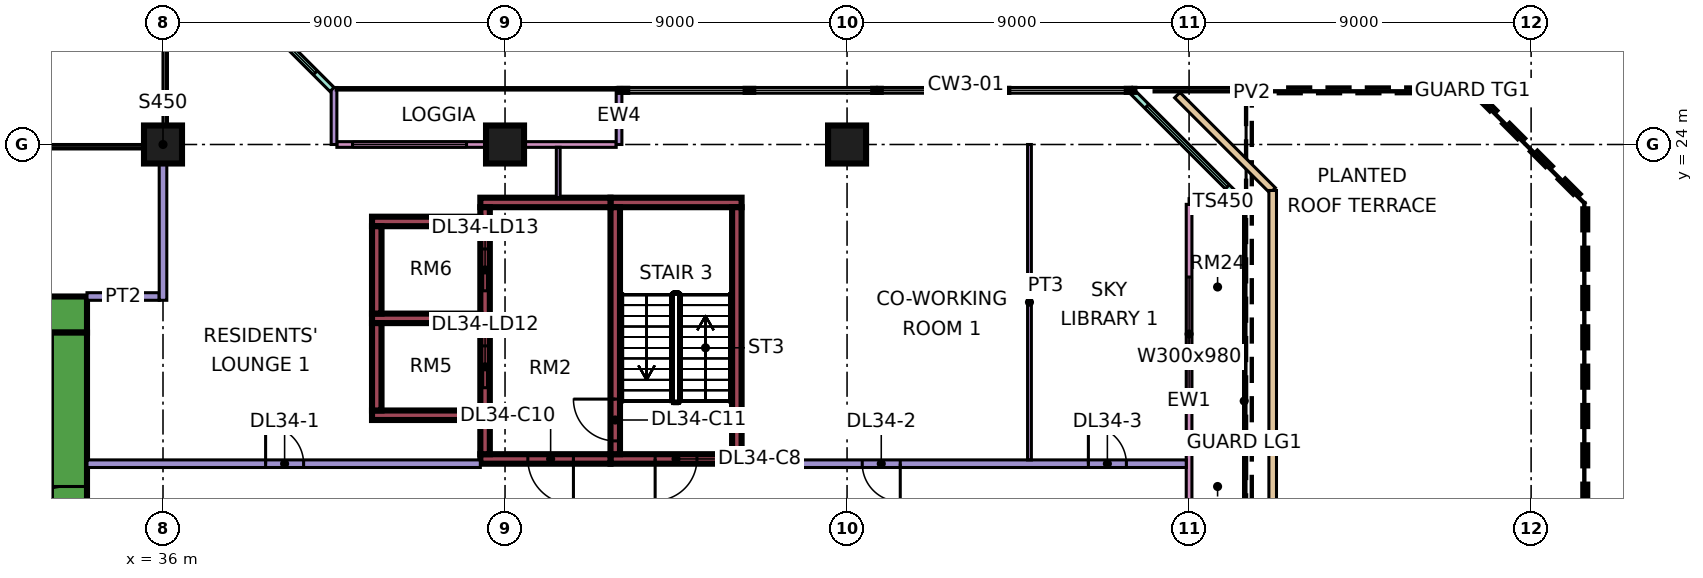
"""IFC4 building model, lengths in metres.
Left out: names, types, materials, properties, quantities, classifications, styles, units other than length and angle.
Written with IfcOpenShell. Run it as: python <this file> out.ifc"""

import sys

from ifc_helpers import new_model, si_unit, direction, frame, frame_2d, origin, origin_2d, place, context, subcontext, project, spatial, rectangle, extrude, element, fill, save


model = new_model("IFC4")
c1 = context("Model", 3, precision=1e-05, world=origin(), true_north=direction((0.0, 1.0)))
c2 = subcontext(c1, "Body", "Model", "MODEL_VIEW")
j1 = project(units=[si_unit("LENGTHUNIT", "METRE"), si_unit("PLANEANGLEUNIT", "RADIAN")], contexts=[c1])
p1 = place(None, origin())
s1 = spatial("IfcSite", under=j1, at=p1, CompositionType="ELEMENT")
p2 = place(p1, origin())
s2 = spatial("IfcBuilding", under=s1, at=p2, CompositionType="ELEMENT")
p3 = place(p2, frame((0.0, 0.0, 146.15)))
s3 = spatial("IfcBuildingStorey", under=s2, at=p3, CompositionType="ELEMENT", Elevation=146.15)
for number, where, z_axis, x_axis in (
    (1, (36.0, 24.0, 0.0), (0.0, 0.0, 1.0), (1.0, 0.0, 0.0)),
    (2, (45.0, 24.0, 0.0), (0.0, 0.0, 1.0), (1.0, 0.0, 0.0)),
    (3, (54.0, 24.0, 0.0), (0.0, 0.0, 1.0), (1.0, 0.0, 0.0)),
):
    element("IfcColumn", number, at=place(p3, frame(where, z_axis=z_axis, x_axis=x_axis)), inside=s3, PredefinedType="COLUMN", context=c2, shape_type="SweptSolid", body=[
        extrude(rectangle(XDim=1.0, YDim=1.0, at=origin_2d()), origin(), (0.0, 0.0, 1.0), 11.25),
    ])
p4 = place(p3, frame((9.0, 19.525, 0.0), z_axis=(0.0, 0.0, 1.0), x_axis=(1.0, 0.0, 0.0)))
e4 = element("IfcWall", 4, at=p4, inside=s3, PredefinedType="SHEAR", context=c2, shape_type="SweptSolid", body=[
    extrude(rectangle(XDim=25.0, YDim=0.95, at=frame_2d((12.5, 0.0))), origin(), (0.0, 0.0, 1.0), 11.25),
])
p5 = place(p4, frame((19.1, 0.0, 0.0)))
e5 = element("IfcOpeningElement", 5, at=p5, cuts=e4, PredefinedType="OPENING", context=c2, shape_type="SweptSolid", body=[
    extrude(rectangle(XDim=1.8, YDim=2.4, at=frame_2d((0.9, 1.2))), frame((0.0, 0.485, 0.0), z_axis=(0.0, -1.0, 0.0), x_axis=(1.0, 0.0, 0.0)), (0.0, 0.0, 1.0), 0.97),
])
p6 = place(p3, frame((33.525, 7.95, 0.0), z_axis=(0.0, 0.0, 1.0), x_axis=(0.0, 1.0, 0.0)))
e6 = element("IfcWall", 6, at=p6, inside=s3, PredefinedType="SHEAR", context=c2, shape_type="SweptSolid", body=[
    extrude(rectangle(XDim=11.1, YDim=0.95, at=frame_2d((5.55, 0.0))), origin(), (0.0, 0.0, 1.0), 11.25),
])
p7 = place(p6, frame((5.25, 0.0, 0.0)))
e7 = element("IfcOpeningElement", 7, at=p7, cuts=e6, PredefinedType="OPENING", context=c2, shape_type="SweptSolid", body=[
    extrude(rectangle(XDim=1.8, YDim=2.4, at=frame_2d((0.9, 1.2))), frame((0.0, 0.485, 0.0), z_axis=(0.0, -1.0, 0.0), x_axis=(1.0, 0.0, 0.0)), (0.0, 0.0, 1.0), 0.97),
])
p8 = place(p3, frame((47.775, 15.725, 0.0), z_axis=(0.0, 0.0, 1.0), x_axis=(1.0, 0.0, 0.0)))
e8 = element("IfcWall", 8, at=p8, inside=s3, PredefinedType="SHEAR", context=c2, shape_type="SweptSolid", body=[
    extrude(rectangle(XDim=3.45, YDim=0.25, at=frame_2d((1.725, 0.0))), origin(), (0.0, 0.0, 1.0), 11.25),
])
p9 = place(p8, frame((1.175, 0.0, 0.0)))
e9 = element("IfcOpeningElement", 9, at=p9, cuts=e8, PredefinedType="OPENING", context=c2, shape_type="SweptSolid", body=[
    extrude(rectangle(XDim=1.1, YDim=2.2, at=frame_2d((0.55, 1.1))), frame((0.0, 0.135, 0.0), z_axis=(0.0, -1.0, 0.0), x_axis=(1.0, 0.0, 0.0)), (0.0, 0.0, 1.0), 0.27),
])
p10 = place(p3, frame((47.775, 22.475, 0.0), z_axis=(0.0, 0.0, 1.0), x_axis=(1.0, 0.0, 0.0)))
e10 = element("IfcWall", 10, at=p10, inside=s3, PredefinedType="SHEAR", context=c2, shape_type="SweptSolid", body=[
    extrude(rectangle(XDim=3.45, YDim=0.25, at=frame_2d((1.725, 0.0))), origin(), (0.0, 0.0, 1.0), 11.25),
])
p11 = place(p3, frame((47.9, 15.85, 0.0), z_axis=(0.0, 0.0, 1.0), x_axis=(0.0, 1.0, 0.0)))
e11 = element("IfcWall", 11, at=p11, inside=s3, PredefinedType="SHEAR", context=c2, shape_type="SweptSolid", body=[
    extrude(rectangle(XDim=6.5, YDim=0.25, at=frame_2d((3.25, 0.0))), origin(), (0.0, 0.0, 1.0), 11.25),
])
p12 = place(p11, frame((0.35, 0.0, 0.0)))
e12 = element("IfcOpeningElement", 12, at=p12, cuts=e11, PredefinedType="OPENING", context=c2, shape_type="SweptSolid", body=[
    extrude(rectangle(XDim=1.1, YDim=2.2, at=frame_2d((0.55, 1.1))), frame((0.0, 0.135, 0.0), z_axis=(0.0, -1.0, 0.0), x_axis=(1.0, 0.0, 0.0)), (0.0, 0.0, 1.0), 0.27),
])
p13 = place(p3, frame((51.1, 15.85, 0.0), z_axis=(0.0, 0.0, 1.0), x_axis=(0.0, 1.0, 0.0)))
e13 = element("IfcWall", 13, at=p13, inside=s3, PredefinedType="SHEAR", context=c2, shape_type="SweptSolid", body=[
    extrude(rectangle(XDim=6.5, YDim=0.25, at=frame_2d((3.25, 0.0))), origin(), (0.0, 0.0, 1.0), 11.25),
])
p14 = place(p3, frame((44.35, 15.725, 0.0), z_axis=(0.0, 0.0, 1.0), x_axis=(1.0, 0.0, 0.0)))
e14 = element("IfcWall", 14, at=p14, inside=s3, PredefinedType="SHEAR", context=c2, shape_type="SweptSolid", body=[
    extrude(rectangle(XDim=3.425, YDim=0.25, at=frame_2d((1.712, 0.0))), origin(), (0.0, 0.0, 1.0), 11.25),
])
p15 = place(p14, frame((1.25, 0.0, 0.0)))
e15 = element("IfcOpeningElement", 15, at=p15, cuts=e14, PredefinedType="OPENING", context=c2, shape_type="SweptSolid", body=[
    extrude(rectangle(XDim=1.2, YDim=2.2, at=frame_2d((0.6, 1.1))), frame((0.0, 0.135, 0.0), z_axis=(0.0, -1.0, 0.0), x_axis=(1.0, 0.0, 0.0)), (0.0, 0.0, 1.0), 0.27),
])
p16 = place(p3, frame((44.35, 22.475, 0.0), z_axis=(0.0, 0.0, 1.0), x_axis=(1.0, 0.0, 0.0)))
e16 = element("IfcWall", 16, at=p16, inside=s3, PredefinedType="SHEAR", context=c2, shape_type="SweptSolid", body=[
    extrude(rectangle(XDim=3.425, YDim=0.25, at=frame_2d((1.712, 0.0))), origin(), (0.0, 0.0, 1.0), 11.25),
])
p17 = place(p3, frame((44.475, 15.85, 0.0), z_axis=(0.0, 0.0, 1.0), x_axis=(0.0, 1.0, 0.0)))
e17 = element("IfcWall", 17, at=p17, inside=s3, PredefinedType="SHEAR", context=c2, shape_type="SweptSolid", body=[
    extrude(rectangle(XDim=6.5, YDim=0.25, at=frame_2d((3.25, 0.0))), origin(), (0.0, 0.0, 1.0), 11.25),
])
p18 = place(p17, frame((1.75, 0.0, 0.0)))
e18 = element("IfcOpeningElement", 18, at=p18, cuts=e17, PredefinedType="OPENING", context=c2, shape_type="SweptSolid", body=[
    extrude(rectangle(XDim=1.1, YDim=2.2, at=frame_2d((0.55, 1.1))), frame((0.0, 0.135, 0.0), z_axis=(0.0, -1.0, 0.0), x_axis=(1.0, 0.0, 0.0)), (0.0, 0.0, 1.0), 0.27),
])
p19 = place(p17, frame((4.3, 0.0, 0.0)))
e19 = element("IfcOpeningElement", 19, at=p19, cuts=e17, PredefinedType="OPENING", context=c2, shape_type="SweptSolid", body=[
    extrude(rectangle(XDim=1.1, YDim=2.2, at=frame_2d((0.55, 1.1))), frame((0.0, 0.135, 0.0), z_axis=(0.0, -1.0, 0.0), x_axis=(1.0, 0.0, 0.0)), (0.0, 0.0, 1.0), 0.27),
])
for number, where, z_axis, x_axis in (
    (20, (41.5, 16.875, 0.0), (0.0, 0.0, 1.0), (1.0, 0.0, 0.0)),
    (21, (41.5, 19.425, 0.0), (0.0, 0.0, 1.0), (1.0, 0.0, 0.0)),
    (22, (41.5, 21.975, 0.0), (0.0, 0.0, 1.0), (1.0, 0.0, 0.0)),
):
    element("IfcWall", number, at=place(p3, frame(where, z_axis=z_axis, x_axis=x_axis)), inside=s3, PredefinedType="SHEAR", context=c2, shape_type="SweptSolid", body=[
        extrude(rectangle(XDim=2.85, YDim=0.25, at=frame_2d((1.425, 0.0))), origin(), (0.0, 0.0, 1.0), 11.25),
    ])
for number, where, z_axis, x_axis in (
    (23, (41.625, 17.0, 0.0), (0.0, 0.0, 1.0), (0.0, 1.0, 0.0)),
    (24, (41.625, 19.55, 0.0), (0.0, 0.0, 1.0), (0.0, 1.0, 0.0)),
):
    element("IfcWall", number, at=place(p3, frame(where, z_axis=z_axis, x_axis=x_axis)), inside=s3, PredefinedType="SHEAR", context=c2, shape_type="SweptSolid", body=[
        extrude(rectangle(XDim=2.3, YDim=0.25, at=frame_2d((1.15, 0.0))), origin(), (0.0, 0.0, 1.0), 11.25),
    ])
p20 = place(p3, frame((47.925, 24.0, 0.0), z_axis=(0.0, 0.0, 1.0), x_axis=(-1.0, 0.0, 0.0)))
e25 = element("IfcWall", 25, at=p20, inside=s3, PredefinedType="SOLIDWALL", context=c2, shape_type="SweptSolid", body=[
    extrude(rectangle(XDim=7.35, YDim=0.15, at=frame_2d((3.675, 0.0))), origin(), (0.0, 0.0, 1.0), 10.85),
])
p21 = place(p20, frame((3.938, 0.0, 0.45)))
e26 = element("IfcOpeningElement", 26, at=p21, cuts=e25, PredefinedType="OPENING", context=c2, shape_type="SweptSolid", body=[
    extrude(rectangle(XDim=3.0, YDim=9.8, at=frame_2d((1.5, 4.9))), frame((0.0, 0.085, 0.0), z_axis=(0.0, -1.0, 0.0), x_axis=(1.0, 0.0, 0.0)), (0.0, 0.0, 1.0), 0.17),
])
for number, where, z_axis, x_axis in (
    (27, (48.0, 25.5, 0.0), (0.0, 0.0, 1.0), (0.0, -1.0, 0.0)),
    (28, (40.5, 25.5, 0.0), (0.0, 0.0, 1.0), (0.0, -1.0, 0.0)),
):
    element("IfcWall", number, at=place(p3, frame(where, z_axis=z_axis, x_axis=x_axis)), inside=s3, PredefinedType="SOLIDWALL", context=c2, shape_type="SweptSolid", body=[
        extrude(rectangle(XDim=1.5, YDim=0.15, at=frame_2d((0.75, 0.0))), origin(), (0.0, 0.0, 1.0), 10.85),
    ])
p22 = place(p3, frame((40.447, 25.447, 0.0), z_axis=(0.0, 0.0, 1.0), x_axis=(-0.707106781187, 0.707106781187, 0.0)))
e29 = element("IfcWall", 29, at=p22, inside=s3, PredefinedType="SOLIDWALL", context=c2, shape_type="SweptSolid", body=[
    extrude(rectangle(XDim=4.243, YDim=0.15, at=frame_2d((2.121, 0.0))), origin(), (0.0, 0.0, 1.0), 10.85),
])
p23 = place(p22, frame((0.621, 0.0, 0.45)))
e30 = element("IfcOpeningElement", 30, at=p23, cuts=e29, PredefinedType="OPENING", context=c2, shape_type="SweptSolid", body=[
    extrude(rectangle(XDim=3.0, YDim=9.8, at=frame_2d((1.5, 4.9))), frame((0.0, 0.085, 0.0), z_axis=(0.0, -1.0, 0.0), x_axis=(1.0, 0.0, 0.0)), (0.0, 0.0, 1.0), 0.17),
])
p24 = place(p3, frame((63.0, 12.075, 0.0), z_axis=(0.0, 0.0, 1.0), x_axis=(0.0, 1.0, 0.0)))
e31 = element("IfcWall", 31, at=p24, inside=s3, PredefinedType="SOLIDWALL", context=c2, shape_type="SweptSolid", body=[
    extrude(rectangle(XDim=10.35, YDim=0.15, at=frame_2d((5.175, 0.0))), origin(), (0.0, 0.0, 1.0), 10.85),
])
p25 = place(p24, frame((5.438, 0.0, 0.45)))
e32 = element("IfcOpeningElement", 32, at=p25, cuts=e31, PredefinedType="OPENING", context=c2, shape_type="SweptSolid", body=[
    extrude(rectangle(XDim=3.0, YDim=9.8, at=frame_2d((1.5, 4.9))), frame((0.0, 0.085, 0.0), z_axis=(0.0, -1.0, 0.0), x_axis=(1.0, 0.0, 0.0)), (0.0, 0.0, 1.0), 0.17),
])
p26 = place(p3, frame((64.5, 22.5, 0.0), z_axis=(0.0, 0.0, 1.0), x_axis=(-1.0, 0.0, 0.0)))
e33 = element("IfcWall", 33, at=p26, inside=s3, PredefinedType="SOLIDWALL", context=c2, shape_type="SweptSolid", body=[
    extrude(rectangle(XDim=1.5, YDim=0.15, at=frame_2d((0.75, 0.0))), origin(), (0.0, 0.0, 1.0), 10.85),
])
p27 = place(p3, frame((64.447, 22.447, 0.0), z_axis=(0.0, 0.0, 1.0), x_axis=(-0.707106781187, 0.707106781187, 0.0)))
e34 = element("IfcWall", 34, at=p27, inside=s3, PredefinedType="SOLIDWALL", context=c2, shape_type="SweptSolid", body=[
    extrude(rectangle(XDim=4.243, YDim=0.15, at=frame_2d((2.121, 0.0))), origin(), (0.0, 0.0, 1.0), 10.85),
])
p28 = place(p27, frame((0.621, 0.0, 0.45)))
e35 = element("IfcOpeningElement", 35, at=p28, cuts=e34, PredefinedType="OPENING", context=c2, shape_type="SweptSolid", body=[
    extrude(rectangle(XDim=3.0, YDim=9.8, at=frame_2d((1.5, 4.9))), frame((0.0, 0.085, 0.0), z_axis=(0.0, -1.0, 0.0), x_axis=(1.0, 0.0, 0.0)), (0.0, 0.0, 1.0), 0.17),
])
p29 = place(p3, frame((62.69, 25.3, 0.0), z_axis=(0.0, 0.0, 1.0), x_axis=(0.707106781187, -0.707106781187, 0.0)))
e36 = element("IfcWall", 36, at=p29, inside=s3, PredefinedType="PARAPET", context=c2, shape_type="SweptSolid", body=[
    extrude(rectangle(XDim=3.55, YDim=0.2, at=frame_2d((1.775, 0.0))), origin(), (0.0, 0.0, 1.0), 0.5),
])
p30 = place(p3, frame((65.2, 22.79, 0.0), z_axis=(0.0, 0.0, 1.0), x_axis=(0.0, -1.0, 0.0)))
e37 = element("IfcWall", 37, at=p30, inside=s3, PredefinedType="PARAPET", context=c2, shape_type="SweptSolid", body=[
    extrude(rectangle(XDim=21.58, YDim=0.2, at=frame_2d((10.79, 0.0))), origin(), (0.0, 0.0, 1.0), 0.5),
])
p31 = place(p3, frame((34.0, 15.6, 0.0), z_axis=(0.0, 0.0, 1.0), x_axis=(1.0, 0.0, 0.0)))
e38 = element("IfcWall", 38, at=p31, inside=s3, PredefinedType="PARTITIONING", context=c2, shape_type="SweptSolid", body=[
    extrude(rectangle(XDim=10.35, YDim=0.2, at=frame_2d((5.175, 0.0))), origin(), (0.0, 0.0, 1.0), 10.85),
])
p32 = place(p31, frame((4.7, 0.0, 0.0)))
e39 = element("IfcOpeningElement", 39, at=p32, cuts=e38, PredefinedType="OPENING", context=c2, shape_type="SweptSolid", body=[
    extrude(rectangle(XDim=1.0, YDim=2.1, at=frame_2d((0.5, 1.05))), frame((0.0, 0.11, 0.0), z_axis=(0.0, -1.0, 0.0), x_axis=(1.0, 0.0, 0.0)), (0.0, 0.0, 1.0), 0.22),
])
p33 = place(p3, frame((34.0, 20.0, 0.0), z_axis=(0.0, 0.0, 1.0), x_axis=(1.0, 0.0, 0.0)))
e40 = element("IfcWall", 40, at=p33, inside=s3, PredefinedType="PARTITIONING", context=c2, shape_type="SweptSolid", body=[
    extrude(rectangle(XDim=1.9, YDim=0.2, at=frame_2d((0.95, 0.0))), origin(), (0.0, 0.0, 1.0), 10.85),
])
p34 = place(p3, frame((36.0, 19.9, 0.0), z_axis=(0.0, 0.0, 1.0), x_axis=(0.0, 1.0, 0.0)))
e41 = element("IfcWall", 41, at=p34, inside=s3, PredefinedType="PARTITIONING", context=c2, shape_type="SweptSolid", body=[
    extrude(rectangle(XDim=4.1, YDim=0.2, at=frame_2d((2.05, 0.0))), origin(), (0.0, 0.0, 1.0), 10.85),
])
p35 = place(p3, frame((46.4, 22.6, 0.0), z_axis=(0.0, 0.0, 1.0), x_axis=(0.0, 1.0, 0.0)))
e42 = element("IfcWall", 42, at=p35, inside=s3, PredefinedType="PARTITIONING", context=c2, shape_type="SweptSolid", body=[
    extrude(rectangle(XDim=1.326, YDim=0.1, at=frame_2d((0.663, 0.0))), origin(), (0.0, 0.0, 1.0), 10.85),
])
p36 = place(p3, frame((51.225, 15.6, 0.0), z_axis=(0.0, 0.0, 1.0), x_axis=(1.0, 0.0, 0.0)))
e43 = element("IfcWall", 43, at=p36, inside=s3, PredefinedType="PARTITIONING", context=c2, shape_type="SweptSolid", body=[
    extrude(rectangle(XDim=11.701, YDim=0.2, at=frame_2d((5.851, 0.0))), origin(), (0.0, 0.0, 1.0), 10.85),
])
p37 = place(p36, frame((3.175, 0.0, 0.0)))
e44 = element("IfcOpeningElement", 44, at=p37, cuts=e43, PredefinedType="OPENING", context=c2, shape_type="SweptSolid", body=[
    extrude(rectangle(XDim=1.0, YDim=2.1, at=frame_2d((0.5, 1.05))), frame((0.0, 0.11, 0.0), z_axis=(0.0, -1.0, 0.0), x_axis=(1.0, 0.0, 0.0)), (0.0, 0.0, 1.0), 0.22),
])
p38 = place(p36, frame((9.125, 0.0, 0.0)))
e45 = element("IfcOpeningElement", 45, at=p38, cuts=e43, PredefinedType="OPENING", context=c2, shape_type="SweptSolid", body=[
    extrude(rectangle(XDim=1.0, YDim=2.1, at=frame_2d((0.5, 1.05))), frame((0.0, 0.11, 0.0), z_axis=(0.0, -1.0, 0.0), x_axis=(1.0, 0.0, 0.0)), (0.0, 0.0, 1.0), 0.22),
])
p39 = place(p3, frame((58.8, 15.7, 0.0), z_axis=(0.0, 0.0, 1.0), x_axis=(0.0, 1.0, 0.0)))
e46 = element("IfcWall", 46, at=p39, inside=s3, PredefinedType="PARTITIONING", context=c2, shape_type="SweptSolid", body=[
    extrude(rectangle(XDim=8.3, YDim=0.1, at=frame_2d((4.15, 0.0))), origin(), (0.0, 0.0, 1.0), 10.85),
])
p40 = place(p21, origin())
e47 = element("IfcWindow", 47, at=p40, inside=s3, PartitioningType="SINGLE_PANEL", PredefinedType="WINDOW", context=c2, shape_type="SweptSolid", body=[
    extrude(rectangle(XDim=3.0, YDim=9.8, at=frame_2d((1.5, 4.9))), frame((0.0, 0.03, 0.0), z_axis=(0.0, -1.0, 0.0), x_axis=(1.0, 0.0, 0.0)), (0.0, 0.0, 1.0), 0.06),
])
fill(e26, e47)
p41 = place(p23, origin())
e48 = element("IfcWindow", 48, at=p41, inside=s3, PartitioningType="SINGLE_PANEL", PredefinedType="WINDOW", context=c2, shape_type="SweptSolid", body=[
    extrude(rectangle(XDim=3.0, YDim=9.8, at=frame_2d((1.5, 4.9))), frame((0.0, 0.03, 0.0), z_axis=(0.0, -1.0, 0.0), x_axis=(1.0, 0.0, 0.0)), (0.0, 0.0, 1.0), 0.06),
])
fill(e30, e48)
p42 = place(p25, origin())
e49 = element("IfcWindow", 49, at=p42, inside=s3, PartitioningType="SINGLE_PANEL", PredefinedType="WINDOW", context=c2, shape_type="SweptSolid", body=[
    extrude(rectangle(XDim=3.0, YDim=9.8, at=frame_2d((1.5, 4.9))), frame((0.0, 0.03, 0.0), z_axis=(0.0, -1.0, 0.0), x_axis=(1.0, 0.0, 0.0)), (0.0, 0.0, 1.0), 0.06),
])
fill(e32, e49)
p43 = place(p28, origin())
e50 = element("IfcWindow", 50, at=p43, inside=s3, PartitioningType="SINGLE_PANEL", PredefinedType="WINDOW", context=c2, shape_type="SweptSolid", body=[
    extrude(rectangle(XDim=3.0, YDim=9.8, at=frame_2d((1.5, 4.9))), frame((0.0, 0.03, 0.0), z_axis=(0.0, -1.0, 0.0), x_axis=(1.0, 0.0, 0.0)), (0.0, 0.0, 1.0), 0.06),
])
fill(e35, e50)
p44 = place(p7, origin())
e51 = element("IfcDoor", 51, at=p44, inside=s3, OperationType="DOUBLE_DOOR_SINGLE_SWING", PredefinedType="DOOR", context=c2, shape_type="SweptSolid", body=[
    extrude(rectangle(XDim=1.8, YDim=2.4, at=frame_2d((0.9, 1.2))), frame((0.0, 0.025, 0.0), z_axis=(0.0, -1.0, 0.0), x_axis=(1.0, 0.0, 0.0)), (0.0, 0.0, 1.0), 0.05),
])
fill(e7, e51)
p45 = place(p9, frame((1.1, 0.0, 0.0), z_axis=(0.0, 0.0, 1.0), x_axis=(-1.0, 0.0, 0.0)))
e52 = element("IfcDoor", 52, at=p45, inside=s3, OperationType="SINGLE_SWING_LEFT", PredefinedType="DOOR", context=c2, shape_type="SweptSolid", body=[
    extrude(rectangle(XDim=1.1, YDim=2.2, at=frame_2d((0.55, 1.1))), frame((0.0, 0.025, 0.0), z_axis=(0.0, -1.0, 0.0), x_axis=(1.0, 0.0, 0.0)), (0.0, 0.0, 1.0), 0.05),
])
fill(e9, e52)
p46 = place(p15, origin())
e53 = element("IfcDoor", 53, at=p46, inside=s3, OperationType="SINGLE_SWING_RIGHT", PredefinedType="DOOR", context=c2, shape_type="SweptSolid", body=[
    extrude(rectangle(XDim=1.2, YDim=2.2, at=frame_2d((0.6, 1.1))), frame((0.0, 0.025, 0.0), z_axis=(0.0, -1.0, 0.0), x_axis=(1.0, 0.0, 0.0)), (0.0, 0.0, 1.0), 0.05),
])
fill(e15, e53)
p47 = place(p12, frame((1.1, 0.0, 0.0), z_axis=(0.0, 0.0, 1.0), x_axis=(-1.0, 0.0, 0.0)))
e54 = element("IfcDoor", 54, at=p47, inside=s3, OperationType="SINGLE_SWING_RIGHT", PredefinedType="DOOR", context=c2, shape_type="SweptSolid", body=[
    extrude(rectangle(XDim=1.1, YDim=2.2, at=frame_2d((0.55, 1.1))), frame((0.0, 0.025, 0.0), z_axis=(0.0, -1.0, 0.0), x_axis=(1.0, 0.0, 0.0)), (0.0, 0.0, 1.0), 0.05),
])
fill(e12, e54)
p48 = place(p18, origin())
e55 = element("IfcDoor", 55, at=p48, inside=s3, OperationType="DOUBLE_DOOR_SLIDING", PredefinedType="DOOR", context=c2, shape_type="SweptSolid", body=[
    extrude(rectangle(XDim=1.1, YDim=2.2, at=frame_2d((0.55, 1.1))), frame((0.0, 0.025, 0.0), z_axis=(0.0, -1.0, 0.0), x_axis=(1.0, 0.0, 0.0)), (0.0, 0.0, 1.0), 0.05),
])
fill(e18, e55)
p49 = place(p19, origin())
e56 = element("IfcDoor", 56, at=p49, inside=s3, OperationType="DOUBLE_DOOR_SLIDING", PredefinedType="DOOR", context=c2, shape_type="SweptSolid", body=[
    extrude(rectangle(XDim=1.1, YDim=2.2, at=frame_2d((0.55, 1.1))), frame((0.0, 0.025, 0.0), z_axis=(0.0, -1.0, 0.0), x_axis=(1.0, 0.0, 0.0)), (0.0, 0.0, 1.0), 0.05),
])
fill(e19, e56)
p50 = place(p32, origin())
e57 = element("IfcDoor", 57, at=p50, inside=s3, OperationType="SINGLE_SWING_LEFT", PredefinedType="DOOR", context=c2, shape_type="SweptSolid", body=[
    extrude(rectangle(XDim=1.0, YDim=2.1, at=frame_2d((0.5, 1.05))), frame((0.0, 0.025, 0.0), z_axis=(0.0, -1.0, 0.0), x_axis=(1.0, 0.0, 0.0)), (0.0, 0.0, 1.0), 0.05),
])
fill(e39, e57)
p51 = place(p37, origin())
e58 = element("IfcDoor", 58, at=p51, inside=s3, OperationType="SINGLE_SWING_RIGHT", PredefinedType="DOOR", context=c2, shape_type="SweptSolid", body=[
    extrude(rectangle(XDim=1.0, YDim=2.1, at=frame_2d((0.5, 1.05))), frame((0.0, 0.025, 0.0), z_axis=(0.0, -1.0, 0.0), x_axis=(1.0, 0.0, 0.0)), (0.0, 0.0, 1.0), 0.05),
])
fill(e44, e58)
p52 = place(p38, origin())
e59 = element("IfcDoor", 59, at=p52, inside=s3, OperationType="SINGLE_SWING_LEFT", PredefinedType="DOOR", context=c2, shape_type="SweptSolid", body=[
    extrude(rectangle(XDim=1.0, YDim=2.1, at=frame_2d((0.5, 1.05))), frame((0.0, 0.025, 0.0), z_axis=(0.0, -1.0, 0.0), x_axis=(1.0, 0.0, 0.0)), (0.0, 0.0, 1.0), 0.05),
])
fill(e45, e59)
save(model, sys.argv[1])
